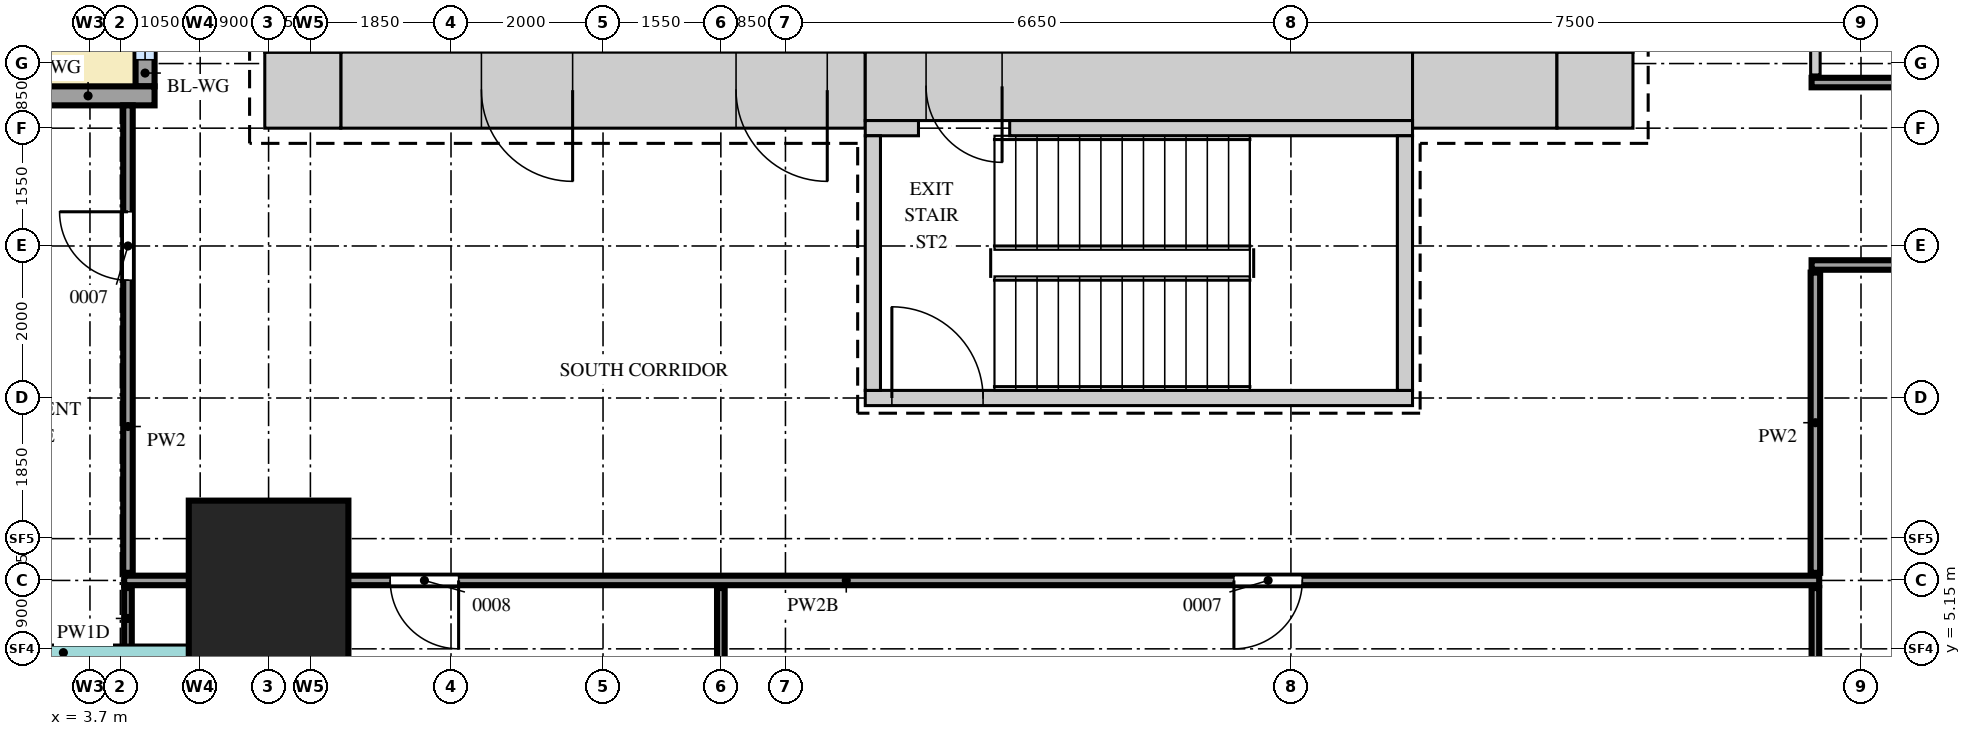
"""IFC4 building model, lengths in metres.
Left out: names, types, materials, properties, quantities, classifications, styles, units other than length and angle.
Written with IfcOpenShell. Run it as: python <this file> out.ifc"""

import sys

from ifc_helpers import new_model, si_unit, direction, frame, frame_2d, origin, origin_2d, place, context, subcontext, project, spatial, rectangle, extrude, source, transform, mapped, element, fill, save


model = new_model("IFC4")
c1 = context("Model", 3, precision=1e-05, world=origin(), true_north=direction((0.0, 1.0)))
c2 = subcontext(c1, "Body", "Model", "MODEL_VIEW")
j1 = project(units=[si_unit("LENGTHUNIT", "METRE"), si_unit("PLANEANGLEUNIT", "RADIAN")], contexts=[c1])
p1 = place(None, origin())
s1 = spatial("IfcSite", under=j1, at=p1, CompositionType="ELEMENT")
p2 = place(p1, origin())
s2 = spatial("IfcBuilding", under=s1, at=p2, CompositionType="ELEMENT")
p3 = place(p2, frame((0.0, 0.0, 154.3)))
s3 = spatial("IfcBuildingStorey", under=s2, at=p3, CompositionType="ELEMENT", Elevation=154.3)
m1 = source(origin(), c2, "Body", "SweptSolid", [
    extrude(rectangle(XDim=6.9, YDim=1.0, at=frame_2d((3.45, 0.0))), origin(), (0.0, 0.0, 1.0), 4.1),
])
p4 = place(p3, frame((7.0, 12.5, 0.0), z_axis=(0.0, 0.0, 1.0), x_axis=(1.0, 0.0, 0.0)))
e1 = element("IfcWall", 1, at=p4, inside=s3, PredefinedType="SHEAR", context=c2, shape_type="MappedRepresentation", body=[
    mapped(m1, transform((0.0, 0.0, 0.0))),
])
m2 = source(origin(), c2, "Body", "SweptSolid", [
    extrude(rectangle(XDim=1.2, YDim=2.1, at=frame_2d((0.6, 1.05))), frame((0.0, 0.51, 0.0), z_axis=(0.0, -1.0, 0.0), x_axis=(1.0, 0.0, 0.0)), (0.0, 0.0, 1.0), 1.02),
])
p5 = place(p4, frame((5.2, 0.0, 0.0)))
e2 = element("IfcOpeningElement", 2, at=p5, cuts=e1, PredefinedType="OPENING", context=c2, shape_type="MappedRepresentation", body=[
    mapped(m2, transform((0.0, 0.0, 0.0))),
])
p6 = place(p4, frame((1.85, 0.0, 0.0)))
e3 = element("IfcOpeningElement", 3, at=p6, cuts=e1, PredefinedType="OPENING", context=c2, shape_type="MappedRepresentation", body=[
    mapped(m2, transform((0.0, 0.0, 0.0))),
])
m3 = source(origin(), c2, "Body", "SweptSolid", [
    extrude(rectangle(XDim=7.2, YDim=0.9, at=frame_2d((3.6, 0.0))), origin(), (0.0, 0.0, 1.0), 4.1),
])
p7 = place(p3, frame((13.9, 12.55, 0.0), z_axis=(0.0, 0.0, 1.0), x_axis=(1.0, 0.0, 0.0)))
e4 = element("IfcWall", 4, at=p7, inside=s3, PredefinedType="SHEAR", context=c2, shape_type="MappedRepresentation", body=[
    mapped(m3, transform((0.0, 0.0, 0.0))),
])
m4 = source(origin(), c2, "Body", "SweptSolid", [
    extrude(rectangle(XDim=1.0, YDim=2.1, at=frame_2d((0.5, 1.05))), frame((0.0, 0.46, 0.0), z_axis=(0.0, -1.0, 0.0), x_axis=(1.0, 0.0, 0.0)), (0.0, 0.0, 1.0), 0.92),
])
p8 = place(p7, frame((0.8, 0.0, 0.0)))
e5 = element("IfcOpeningElement", 5, at=p8, cuts=e4, PredefinedType="OPENING", context=c2, shape_type="MappedRepresentation", body=[
    mapped(m4, transform((0.0, 0.0, 0.0))),
])
m5 = source(origin(), c2, "Body", "SweptSolid", [
    extrude(rectangle(XDim=1.9, YDim=1.0, at=frame_2d((0.95, 0.0))), origin(), (0.0, 0.0, 1.0), 4.1),
])
p9 = place(p3, frame((21.1, 12.5, 0.0), z_axis=(0.0, 0.0, 1.0), x_axis=(1.0, 0.0, 0.0)))
e6 = element("IfcWall", 6, at=p9, inside=s3, PredefinedType="SHEAR", context=c2, shape_type="MappedRepresentation", body=[
    mapped(m5, transform((0.0, 0.0, 0.0))),
])
m6 = source(origin(), c2, "Body", "SweptSolid", [
    extrude(rectangle(XDim=1.0, YDim=1.0, at=frame_2d((0.5, 0.0))), origin(), (0.0, 0.0, 1.0), 4.1),
])
for number, where, z_axis, x_axis in (
    (7, (23.0, 12.5, 0.0), (0.0, 0.0, 1.0), (1.0, 0.0, 0.0)),
    (8, (6.0, 12.5, 0.0), (0.0, 0.0, 1.0), (1.0, 0.0, 0.0)),
):
    element("IfcWall", number, at=place(p3, frame(where, z_axis=z_axis, x_axis=x_axis)), inside=s3, PredefinedType="SHEAR", context=c2, shape_type="MappedRepresentation", body=[
        mapped(m6, transform((0.0, 0.0, 0.0))),
    ])
m7 = source(origin(), c2, "Body", "SweptSolid", [
    extrude(rectangle(XDim=0.7, YDim=0.2, at=frame_2d((0.35, 0.0))), origin(), (0.0, 0.0, 1.0), 4.1),
])
p10 = place(p3, frame((13.9, 12.0, 0.0), z_axis=(0.0, 0.0, 1.0), x_axis=(1.0, 0.0, 0.0)))
e9 = element("IfcWall", 9, at=p10, inside=s3, PredefinedType="SHEAR", context=c2, shape_type="MappedRepresentation", body=[
    mapped(m7, transform((0.0, 0.0, 0.0))),
])
m8 = source(origin(), c2, "Body", "SweptSolid", [
    extrude(rectangle(XDim=5.3, YDim=0.2, at=frame_2d((2.65, 0.0))), origin(), (0.0, 0.0, 1.0), 4.1),
])
p11 = place(p3, frame((15.8, 12.0, 0.0), z_axis=(0.0, 0.0, 1.0), x_axis=(1.0, 0.0, 0.0)))
e10 = element("IfcWall", 10, at=p11, inside=s3, PredefinedType="SHEAR", context=c2, shape_type="MappedRepresentation", body=[
    mapped(m8, transform((0.0, 0.0, 0.0))),
])
m9 = source(origin(), c2, "Body", "SweptSolid", [
    extrude(rectangle(XDim=7.2, YDim=0.2, at=frame_2d((3.6, 0.0))), origin(), (0.0, 0.0, 1.0), 4.1),
])
p12 = place(p3, frame((13.9, 8.45, 0.0), z_axis=(0.0, 0.0, 1.0), x_axis=(1.0, 0.0, 0.0)))
e11 = element("IfcWall", 11, at=p12, inside=s3, PredefinedType="SHEAR", context=c2, shape_type="MappedRepresentation", body=[
    mapped(m9, transform((0.0, 0.0, 0.0))),
])
m10 = source(origin(), c2, "Body", "SweptSolid", [
    extrude(rectangle(XDim=1.2, YDim=2.1, at=frame_2d((0.6, 1.05))), frame((0.0, 0.11, 0.0), z_axis=(0.0, -1.0, 0.0), x_axis=(1.0, 0.0, 0.0)), (0.0, 0.0, 1.0), 0.22),
])
p13 = place(p12, frame((0.35, 0.0, 0.0)))
e12 = element("IfcOpeningElement", 12, at=p13, cuts=e11, PredefinedType="OPENING", context=c2, shape_type="MappedRepresentation", body=[
    mapped(m10, transform((0.0, 0.0, 0.0))),
])
m11 = source(origin(), c2, "Body", "SweptSolid", [
    extrude(rectangle(XDim=3.35, YDim=0.2, at=frame_2d((1.675, 0.0))), origin(), (0.0, 0.0, 1.0), 4.1),
])
for number, where, z_axis, x_axis in (
    (13, (21.0, 8.55, 0.0), (0.0, 0.0, 1.0), (0.0, 1.0, 0.0)),
    (14, (14.0, 8.55, 0.0), (0.0, 0.0, 1.0), (0.0, 1.0, 0.0)),
):
    element("IfcWall", number, at=place(p3, frame(where, z_axis=z_axis, x_axis=x_axis)), inside=s3, PredefinedType="SHEAR", context=c2, shape_type="MappedRepresentation", body=[
        mapped(m11, transform((0.0, 0.0, 0.0))),
    ])
m12 = source(origin(), c2, "Body", "SweptSolid", [
    extrude(rectangle(XDim=2.1, YDim=2.1, at=origin_2d()), origin(), (0.0, 0.0, 1.0), 4.4),
])
p14 = place(p3, frame((6.05, 6.05, 0.0), z_axis=(0.0, 0.0, 1.0), x_axis=(1.0, 0.0, 0.0)))
e15 = element("IfcColumn", 15, at=p14, inside=s3, PredefinedType="COLUMN", context=c2, shape_type="MappedRepresentation", body=[
    mapped(m12, transform((0.0, 0.0, 0.0))),
])
m13 = source(origin(), c2, "Body", "SweptSolid", [
    extrude(rectangle(XDim=6.4, YDim=0.25, at=frame_2d((3.2, 0.0))), origin(), (0.0, 0.0, 1.0), 3.35),
])
p15 = place(p3, frame((4.425, 12.55, 0.0), z_axis=(0.0, 0.0, 1.0), x_axis=(0.0, 1.0, 0.0)))
e16 = element("IfcWall", 16, at=p15, inside=s3, PredefinedType="SOLIDWALL", context=c2, shape_type="MappedRepresentation", body=[
    mapped(m13, transform((0.0, 0.0, 0.0))),
])
m14 = source(origin(), c2, "Body", "SweptSolid", [
    extrude(rectangle(XDim=1.65, YDim=2.4, at=frame_2d((0.825, 1.2))), frame((0.0, 0.135, 0.0), z_axis=(0.0, -1.0, 0.0), x_axis=(1.0, 0.0, 0.0)), (0.0, 0.0, 1.0), 0.27),
])
p16 = place(p15, frame((0.35, 0.0, 0.0)))
e17 = element("IfcOpeningElement", 17, at=p16, cuts=e16, PredefinedType="OPENING", context=c2, shape_type="MappedRepresentation", body=[
    mapped(m14, transform((0.0, 0.0, 0.0))),
])
p17 = place(p15, frame((4.4, 0.0, 0.0)))
e18 = element("IfcOpeningElement", 18, at=p17, cuts=e16, PredefinedType="OPENING", context=c2, shape_type="MappedRepresentation", body=[
    mapped(m14, transform((0.0, 0.0, 0.0))),
])
m15 = source(origin(), c2, "Body", "SweptSolid", [
    extrude(rectangle(XDim=1.8, YDim=2.4, at=frame_2d((0.9, 1.2))), frame((0.0, 0.135, 0.0), z_axis=(0.0, -1.0, 0.0), x_axis=(1.0, 0.0, 0.0)), (0.0, 0.0, 1.0), 0.27),
])
p18 = place(p15, frame((2.3, 0.0, 0.0)))
e19 = element("IfcOpeningElement", 19, at=p18, cuts=e16, PredefinedType="OPENING", context=c2, shape_type="MappedRepresentation", body=[
    mapped(m15, transform((0.0, 0.0, 0.0))),
])
m16 = source(origin(), c2, "Body", "SweptSolid", [
    extrude(rectangle(XDim=1.75, YDim=0.25, at=frame_2d((0.875, 0.0))), origin(), (0.0, 0.0, 1.0), 3.35),
])
p19 = place(p3, frame((2.8, 12.425, 0.0), z_axis=(0.0, 0.0, 1.0), x_axis=(1.0, 0.0, 0.0)))
e20 = element("IfcWall", 20, at=p19, inside=s3, PredefinedType="SOLIDWALL", context=c2, shape_type="MappedRepresentation", body=[
    mapped(m16, transform((0.0, 0.0, 0.0))),
])
m17 = source(origin(), c2, "Body", "SweptSolid", [
    extrude(rectangle(XDim=4.3, YDim=0.1, at=frame_2d((2.15, 0.0))), origin(), (0.0, 0.0, 1.0), 3.5),
])
p20 = place(p3, frame((12.0, 1.65, 0.0), z_axis=(0.0, 0.0, 1.0), x_axis=(0.0, 1.0, 0.0)))
e21 = element("IfcWall", 21, at=p20, inside=s3, PredefinedType="PARTITIONING", context=c2, shape_type="MappedRepresentation", body=[
    mapped(m17, transform((0.0, 0.0, 0.0))),
])
m18 = source(origin(), c2, "Body", "SweptSolid", [
    extrude(rectangle(XDim=4.3, YDim=0.1, at=frame_2d((2.15, 0.0))), origin(), (0.0, 0.0, 1.0), 4.2),
])
p21 = place(p3, frame((26.4, 1.65, 0.0), z_axis=(0.0, 0.0, 1.0), x_axis=(0.0, 1.0, 0.0)))
e22 = element("IfcWall", 22, at=p21, inside=s3, PredefinedType="PARTITIONING", context=c2, shape_type="MappedRepresentation", body=[
    mapped(m18, transform((0.0, 0.0, 0.0))),
])
m19 = source(origin(), c2, "Body", "SweptSolid", [
    extrude(rectangle(XDim=0.8, YDim=0.1, at=frame_2d((0.4, 0.0))), origin(), (0.0, 0.0, 1.0), 4.2),
])
p22 = place(p3, frame((4.2, 5.15, 0.0), z_axis=(0.0, 0.0, 1.0), x_axis=(0.0, 1.0, 0.0)))
e23 = element("IfcWall", 23, at=p22, inside=s3, PredefinedType="PARTITIONING", context=c2, shape_type="MappedRepresentation", body=[
    mapped(m19, transform((0.0, 0.0, 0.0))),
])
m20 = source(origin(), c2, "Body", "SweptSolid", [
    extrude(rectangle(XDim=22.3, YDim=0.125, at=frame_2d((11.15, 0.0))), origin(), (0.0, 0.0, 1.0), 3.4),
])
p23 = place(p3, frame((4.15, 6.05, 0.0), z_axis=(0.0, 0.0, 1.0), x_axis=(1.0, 0.0, 0.0)))
e24 = element("IfcWall", 24, at=p23, inside=s3, PredefinedType="PARTITIONING", context=c2, shape_type="MappedRepresentation", body=[
    mapped(m20, transform((0.0, 0.0, 0.0))),
])
m21 = source(origin(), c2, "Body", "SweptSolid", [
    extrude(rectangle(XDim=0.9, YDim=2.1, at=frame_2d((0.45, 1.05))), frame((0.0, 0.073, 0.0), z_axis=(0.0, -1.0, 0.0), x_axis=(1.0, 0.0, 0.0)), (0.0, 0.0, 1.0), 0.145),
])
p24 = place(p23, frame((3.5, 0.0, 0.0)))
e25 = element("IfcOpeningElement", 25, at=p24, cuts=e24, PredefinedType="OPENING", context=c2, shape_type="MappedRepresentation", body=[
    mapped(m21, transform((0.0, 0.0, 0.0))),
])
p25 = place(p23, frame((14.6, 0.0, 0.0)))
e26 = element("IfcOpeningElement", 26, at=p25, cuts=e24, PredefinedType="OPENING", context=c2, shape_type="MappedRepresentation", body=[
    mapped(m21, transform((0.0, 0.0, 0.0))),
])
m22 = source(origin(), c2, "Body", "SweptSolid", [
    extrude(rectangle(XDim=6.15, YDim=0.125, at=frame_2d((3.075, 0.0))), origin(), (0.0, 0.0, 1.0), 4.2),
])
p26 = place(p3, frame((4.2, 6.15, 0.0), z_axis=(0.0, 0.0, 1.0), x_axis=(0.0, 1.0, 0.0)))
e27 = element("IfcWall", 27, at=p26, inside=s3, PredefinedType="PARTITIONING", context=c2, shape_type="MappedRepresentation", body=[
    mapped(m22, transform((0.0, 0.0, 0.0))),
])
p27 = place(p26, frame((3.85, 0.0, 0.0)))
e28 = element("IfcOpeningElement", 28, at=p27, cuts=e27, PredefinedType="OPENING", context=c2, shape_type="MappedRepresentation", body=[
    mapped(m21, transform((0.0, 0.0, 0.0))),
])
m23 = source(origin(), c2, "Body", "SweptSolid", [
    extrude(rectangle(XDim=3.95, YDim=0.125, at=frame_2d((1.975, 0.0))), origin(), (0.0, 0.0, 1.0), 4.2),
])
p28 = place(p3, frame((26.4, 6.15, 0.0), z_axis=(0.0, 0.0, 1.0), x_axis=(0.0, 1.0, 0.0)))
e29 = element("IfcWall", 29, at=p28, inside=s3, PredefinedType="PARTITIONING", context=c2, shape_type="MappedRepresentation", body=[
    mapped(m23, transform((0.0, 0.0, 0.0))),
])
m24 = source(origin(), c2, "Body", "SweptSolid", [
    extrude(rectangle(XDim=20.0, YDim=0.125, at=frame_2d((10.0, 0.0))), origin(), (0.0, 0.0, 1.0), 4.2),
])
p29 = place(p3, frame((26.35, 10.2, 0.0), z_axis=(0.0, 0.0, 1.0), x_axis=(1.0, 0.0, 0.0)))
e30 = element("IfcWall", 30, at=p29, inside=s3, PredefinedType="PARTITIONING", context=c2, shape_type="MappedRepresentation", body=[
    mapped(m24, transform((0.0, 0.0, 0.0))),
])
m25 = source(origin(), c2, "Body", "SweptSolid", [
    extrude(rectangle(XDim=1.2, YDim=2.1, at=frame_2d((0.6, 1.05))), frame((0.0, 0.073, 0.0), z_axis=(0.0, -1.0, 0.0), x_axis=(1.0, 0.0, 0.0)), (0.0, 0.0, 1.0), 0.145),
])
p30 = place(p29, frame((8.25, 0.0, 0.0)))
e31 = element("IfcOpeningElement", 31, at=p30, cuts=e30, PredefinedType="OPENING", context=c2, shape_type="MappedRepresentation", body=[
    mapped(m25, transform((0.0, 0.0, 0.0))),
])
m26 = source(origin(), c2, "Body", "SweptSolid", [
    extrude(rectangle(XDim=17.7, YDim=0.125, at=frame_2d((8.85, 0.0))), origin(), (0.0, 0.0, 1.0), 4.2),
])
p31 = place(p3, frame((26.35, 12.6, 0.0), z_axis=(0.0, 0.0, 1.0), x_axis=(1.0, 0.0, 0.0)))
e32 = element("IfcWall", 32, at=p31, inside=s3, PredefinedType="PARTITIONING", context=c2, shape_type="MappedRepresentation", body=[
    mapped(m26, transform((0.0, 0.0, 0.0))),
])
m27 = source(origin(), c2, "Body", "SweptSolid", [
    extrude(rectangle(XDim=23.2, YDim=0.125, at=frame_2d((11.6, 0.0))), origin(), (0.0, 0.0, 1.0), 4.2),
])
p32 = place(p3, frame((26.4, 12.7, 0.0), z_axis=(0.0, 0.0, 1.0), x_axis=(0.0, 1.0, 0.0)))
e33 = element("IfcWall", 33, at=p32, inside=s3, PredefinedType="PARTITIONING", context=c2, shape_type="MappedRepresentation", body=[
    mapped(m27, transform((0.0, 0.0, 0.0))),
])
p33 = place(p32, frame((6.65, 0.0, 0.0)))
e34 = element("IfcOpeningElement", 34, at=p33, cuts=e33, PredefinedType="OPENING", context=c2, shape_type="MappedRepresentation", body=[
    mapped(m25, transform((0.0, 0.0, 0.0))),
])
m28 = source(origin(), c2, "Body", "SweptSolid", [
    extrude(rectangle(XDim=1.65, YDim=2.4, at=frame_2d((0.825, 1.2))), frame((0.0, 0.03, 0.0), z_axis=(0.0, -1.0, 0.0), x_axis=(1.0, 0.0, 0.0)), (0.0, 0.0, 1.0), 0.06),
])
p34 = place(p16, origin())
e35 = element("IfcWindow", 35, at=p34, inside=s3, PartitioningType="SINGLE_PANEL", PredefinedType="WINDOW", context=c2, shape_type="MappedRepresentation", body=[
    mapped(m28, transform((0.0, 0.0, 0.0))),
])
fill(e17, e35)
m29 = source(origin(), c2, "Body", "SweptSolid", [
    extrude(rectangle(XDim=1.2, YDim=2.1, at=frame_2d((0.6, 1.05))), frame((0.0, 0.45, 0.0), z_axis=(0.0, -1.0, 0.0), x_axis=(1.0, 0.0, 0.0)), (0.0, 0.0, 1.0), 0.9),
])
p35 = place(p5, origin())
e36 = element("IfcDoor", 36, at=p35, inside=s3, OperationType="SINGLE_SWING_RIGHT", PredefinedType="DOOR", context=c2, shape_type="MappedRepresentation", body=[
    mapped(m29, transform((0.0, 0.0, 0.0))),
])
fill(e2, e36)
p36 = place(p6, origin())
e37 = element("IfcDoor", 37, at=p36, inside=s3, OperationType="SINGLE_SWING_RIGHT", PredefinedType="DOOR", context=c2, shape_type="MappedRepresentation", body=[
    mapped(m29, transform((0.0, 0.0, 0.0))),
])
fill(e3, e37)
m30 = source(origin(), c2, "Body", "SweptSolid", [
    extrude(rectangle(XDim=1.0, YDim=2.1, at=frame_2d((0.5, 1.05))), frame((0.0, 0.4, 0.0), z_axis=(0.0, -1.0, 0.0), x_axis=(1.0, 0.0, 0.0)), (0.0, 0.0, 1.0), 0.8),
])
p37 = place(p8, origin())
e38 = element("IfcDoor", 38, at=p37, inside=s3, OperationType="SINGLE_SWING_RIGHT", PredefinedType="DOOR", context=c2, shape_type="MappedRepresentation", body=[
    mapped(m30, transform((0.0, 0.0, 0.0))),
])
fill(e5, e38)
m31 = source(origin(), c2, "Body", "SweptSolid", [
    extrude(rectangle(XDim=0.9, YDim=2.1, at=frame_2d((0.45, 1.05))), frame((0.0, 0.025, 0.0), z_axis=(0.0, -1.0, 0.0), x_axis=(1.0, 0.0, 0.0)), (0.0, 0.0, 1.0), 0.05),
])
p38 = place(p24, origin())
e39 = element("IfcDoor", 39, at=p38, inside=s3, OperationType="SINGLE_SWING_RIGHT", PredefinedType="DOOR", context=c2, shape_type="MappedRepresentation", body=[
    mapped(m31, transform((0.0, 0.0, 0.0))),
])
fill(e25, e39)
p39 = place(p25, origin())
e40 = element("IfcDoor", 40, at=p39, inside=s3, OperationType="SINGLE_SWING_LEFT", PredefinedType="DOOR", context=c2, shape_type="MappedRepresentation", body=[
    mapped(m31, transform((0.0, 0.0, 0.0))),
])
fill(e26, e40)
p40 = place(p27, origin())
e41 = element("IfcDoor", 41, at=p40, inside=s3, OperationType="SINGLE_SWING_LEFT", PredefinedType="DOOR", context=c2, shape_type="MappedRepresentation", body=[
    mapped(m31, transform((0.0, 0.0, 0.0))),
])
fill(e28, e41)
m32 = source(origin(), c2, "Body", "SweptSolid", [
    extrude(rectangle(XDim=1.2, YDim=2.1, at=frame_2d((0.6, 1.05))), frame((0.0, 0.025, 0.0), z_axis=(0.0, -1.0, 0.0), x_axis=(1.0, 0.0, 0.0)), (0.0, 0.0, 1.0), 0.05),
])
p41 = place(p13, origin())
e42 = element("IfcDoor", 42, at=p41, inside=s3, OperationType="SINGLE_SWING_RIGHT", PredefinedType="DOOR", context=c2, shape_type="MappedRepresentation", body=[
    mapped(m32, transform((0.0, 0.0, 0.0))),
])
fill(e12, e42)
save(model, sys.argv[1])
